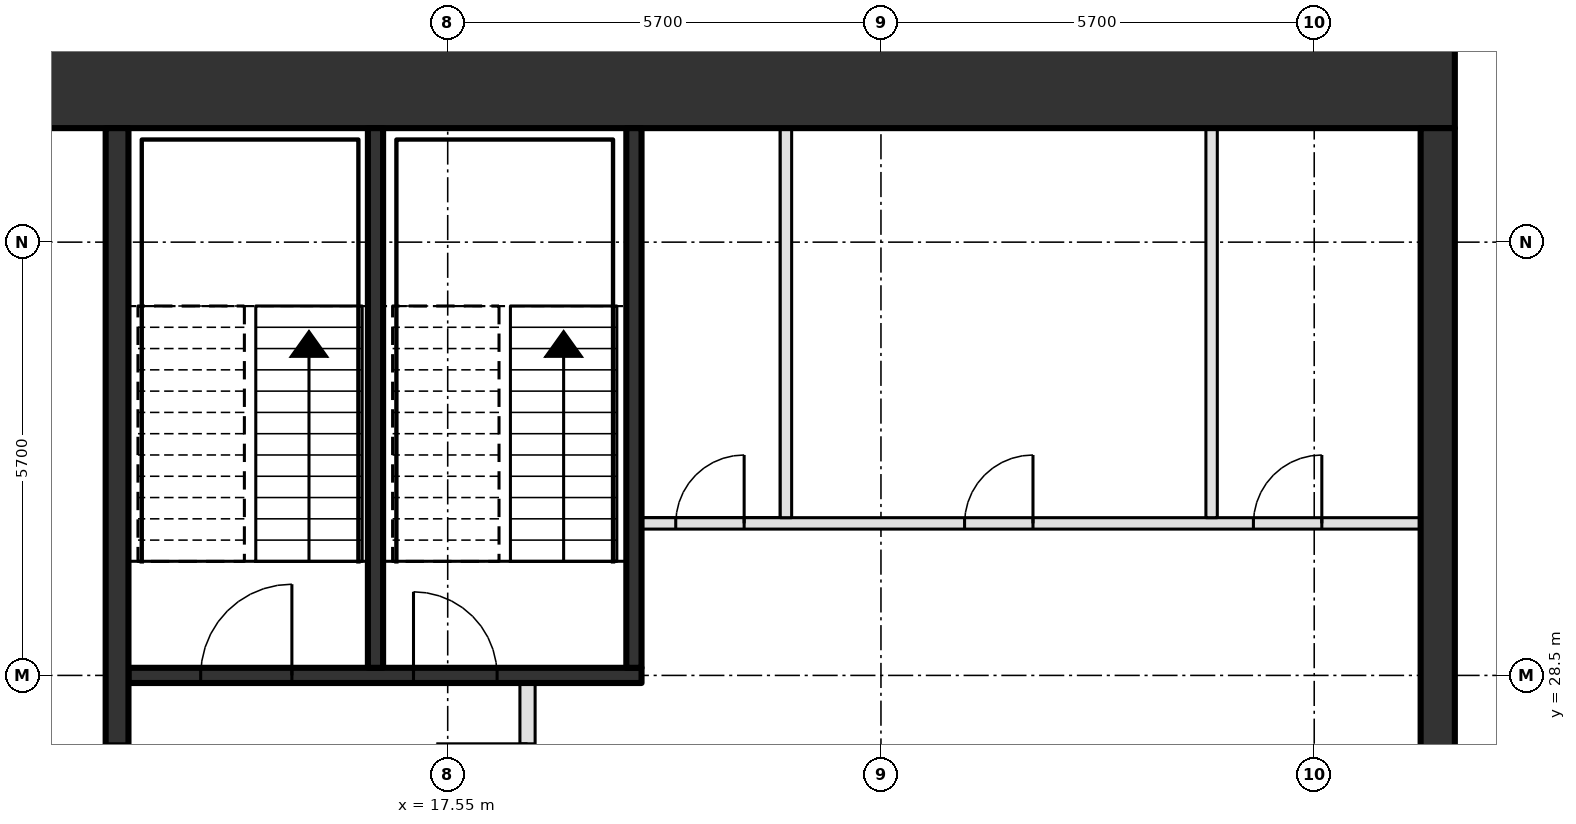
"""IFC4 building model, lengths in metres.
Left out: names, types, materials, properties, quantities, classifications, styles, units other than length and angle.
Written with IfcOpenShell. Run it as: python <this file> out.ifc"""

import sys

from ifc_helpers import new_model, si_unit, direction, frame, frame_2d, origin, place, context, subcontext, project, spatial, rectangle, extrude, element, fill, save


model = new_model("IFC4")
c1 = context("Model", 3, precision=1e-05, world=origin(), true_north=direction((0.0, 1.0)))
c2 = subcontext(c1, "Body", "Model", "MODEL_VIEW")
j1 = project(units=[si_unit("LENGTHUNIT", "METRE"), si_unit("PLANEANGLEUNIT", "RADIAN")], contexts=[c1])
p1 = place(None, origin())
s1 = spatial("IfcSite", under=j1, at=p1, CompositionType="ELEMENT")
p2 = place(p1, origin())
s2 = spatial("IfcBuilding", under=s1, at=p2, CompositionType="ELEMENT")
p3 = place(p2, frame((0.0, 0.0, 424.2)))
s3 = spatial("IfcBuildingStorey", under=s2, at=p3, CompositionType="ELEMENT", Elevation=424.2)
p4 = place(p3, frame((8.0, 36.3, -0.3), z_axis=(0.0, 0.0, 1.0), x_axis=(1.0, 0.0, 0.0)))
e1 = element("IfcWall", 1, at=p4, inside=s3, PredefinedType="SHEAR", context=c2, shape_type="SweptSolid", body=[
    extrude(rectangle(XDim=22.8, YDim=1.2, at=frame_2d((11.4, 0.0))), origin(), (0.0, 0.0, 1.0), 4.75),
])
p5 = place(p4, frame((2.3, 0.0, 0.3)))
e2 = element("IfcOpeningElement", 2, at=p5, cuts=e1, PredefinedType="OPENING", context=c2, shape_type="SweptSolid", body=[
    extrude(rectangle(XDim=1.8, YDim=2.1, at=frame_2d((0.9, 1.05))), frame((0.0, 0.61, 0.0), z_axis=(0.0, -1.0, 0.0), x_axis=(1.0, 0.0, 0.0)), (0.0, 0.0, 1.0), 1.22),
])
p6 = place(p3, frame((30.575, 14.55, -0.3), z_axis=(0.0, 0.0, 1.0), x_axis=(0.0, 1.0, 0.0)))
e3 = element("IfcWall", 3, at=p6, inside=s3, PredefinedType="SHEAR", context=c2, shape_type="SweptSolid", body=[
    extrude(rectangle(XDim=21.15, YDim=0.45, at=frame_2d((10.575, 0.0))), origin(), (0.0, 0.0, 1.0), 4.75),
])
p7 = place(p3, frame((13.35, 28.5, 0.0), z_axis=(0.0, 0.0, 1.0), x_axis=(1.0, 0.0, 0.0)))
e4 = element("IfcWall", 4, at=p7, inside=s3, PredefinedType="SOLIDWALL", context=c2, shape_type="SweptSolid", body=[
    extrude(rectangle(XDim=6.75, YDim=0.2, at=frame_2d((3.375, 0.0))), origin(), (0.0, 0.0, 1.0), 4.45),
])
p8 = place(p7, frame((0.95, 0.0, 0.0)))
e5 = element("IfcOpeningElement", 5, at=p8, cuts=e4, PredefinedType="OPENING", context=c2, shape_type="SweptSolid", body=[
    extrude(rectangle(XDim=1.2, YDim=2.1, at=frame_2d((0.6, 1.05))), frame((0.0, 0.11, 0.0), z_axis=(0.0, -1.0, 0.0), x_axis=(1.0, 0.0, 0.0)), (0.0, 0.0, 1.0), 0.22),
])
p9 = place(p7, frame((3.75, 0.0, 0.0)))
e6 = element("IfcOpeningElement", 6, at=p9, cuts=e4, PredefinedType="OPENING", context=c2, shape_type="SweptSolid", body=[
    extrude(rectangle(XDim=1.1, YDim=2.1, at=frame_2d((0.55, 1.05))), frame((0.0, 0.11, 0.0), z_axis=(0.0, -1.0, 0.0), x_axis=(1.0, 0.0, 0.0)), (0.0, 0.0, 1.0), 0.22),
])
p10 = place(p3, frame((20.1, 30.5, 0.0), z_axis=(0.0, 0.0, 1.0), x_axis=(1.0, 0.0, 0.0)))
e7 = element("IfcWall", 7, at=p10, inside=s3, PredefinedType="PARTITIONING", context=c2, shape_type="SweptSolid", body=[
    extrude(rectangle(XDim=10.25, YDim=0.15, at=frame_2d((5.125, 0.0))), origin(), (0.0, 0.0, 1.0), 4.45),
])
p11 = place(p10, frame((0.45, 0.0, 0.0)))
e8 = element("IfcOpeningElement", 8, at=p11, cuts=e7, PredefinedType="OPENING", context=c2, shape_type="SweptSolid", body=[
    extrude(rectangle(XDim=0.9, YDim=2.1, at=frame_2d((0.45, 1.05))), frame((0.0, 0.085, 0.0), z_axis=(0.0, -1.0, 0.0), x_axis=(1.0, 0.0, 0.0)), (0.0, 0.0, 1.0), 0.17),
])
p12 = place(p10, frame((4.25, 0.0, 0.0)))
e9 = element("IfcOpeningElement", 9, at=p12, cuts=e7, PredefinedType="OPENING", context=c2, shape_type="SweptSolid", body=[
    extrude(rectangle(XDim=0.9, YDim=2.1, at=frame_2d((0.45, 1.05))), frame((0.0, 0.085, 0.0), z_axis=(0.0, -1.0, 0.0), x_axis=(1.0, 0.0, 0.0)), (0.0, 0.0, 1.0), 0.17),
])
p13 = place(p10, frame((8.05, 0.0, 0.0)))
e10 = element("IfcOpeningElement", 10, at=p13, cuts=e7, PredefinedType="OPENING", context=c2, shape_type="SweptSolid", body=[
    extrude(rectangle(XDim=0.9, YDim=2.1, at=frame_2d((0.45, 1.05))), frame((0.0, 0.085, 0.0), z_axis=(0.0, -1.0, 0.0), x_axis=(1.0, 0.0, 0.0)), (0.0, 0.0, 1.0), 0.17),
])
p14 = place(p3, frame((13.2, 14.55, 0.0), z_axis=(0.0, 0.0, 1.0), x_axis=(0.0, 1.0, 0.0)))
e11 = element("IfcWall", 11, at=p14, inside=s3, PredefinedType="SHEAR", context=c2, shape_type="SweptSolid", body=[
    extrude(rectangle(XDim=21.15, YDim=0.3, at=frame_2d((10.575, 0.0))), origin(), (0.0, 0.0, 1.0), 4.45),
])
p15 = place(p14, frame((3.75, 0.0, 0.0)))
e12 = element("IfcOpeningElement", 12, at=p15, cuts=e11, PredefinedType="OPENING", context=c2, shape_type="SweptSolid", body=[
    extrude(rectangle(XDim=1.8, YDim=2.1, at=frame_2d((0.9, 1.05))), frame((0.0, 0.16, 0.0), z_axis=(0.0, -1.0, 0.0), x_axis=(1.0, 0.0, 0.0)), (0.0, 0.0, 1.0), 0.32),
])
p16 = place(p14, frame((11.85, 0.0, 0.0)))
e13 = element("IfcOpeningElement", 13, at=p16, cuts=e11, PredefinedType="OPENING", context=c2, shape_type="SweptSolid", body=[
    extrude(rectangle(XDim=1.2, YDim=2.1, at=frame_2d((0.6, 1.05))), frame((0.0, 0.16, 0.0), z_axis=(0.0, -1.0, 0.0), x_axis=(1.0, 0.0, 0.0)), (0.0, 0.0, 1.0), 0.32),
])
p17 = place(p3, frame((16.6, 28.6, 0.0), z_axis=(0.0, 0.0, 1.0), x_axis=(0.0, 1.0, 0.0)))
e14 = element("IfcWall", 14, at=p17, inside=s3, PredefinedType="SOLIDWALL", context=c2, shape_type="SweptSolid", body=[
    extrude(rectangle(XDim=7.1, YDim=0.2, at=frame_2d((3.55, 0.0))), origin(), (0.0, 0.0, 1.0), 4.45),
])
p18 = place(p3, frame((18.6, 23.25, 0.0), z_axis=(0.0, 0.0, 1.0), x_axis=(0.0, 1.0, 0.0)))
e15 = element("IfcWall", 15, at=p18, inside=s3, PredefinedType="SOLIDWALL", context=c2, shape_type="SweptSolid", body=[
    extrude(rectangle(XDim=5.15, YDim=0.2, at=frame_2d((2.575, 0.0))), origin(), (0.0, 0.0, 1.0), 4.45),
])
p19 = place(p18, frame((3.15, 0.0, 0.0)))
e16 = element("IfcOpeningElement", 16, at=p19, cuts=e15, PredefinedType="OPENING", context=c2, shape_type="SweptSolid", body=[
    extrude(rectangle(XDim=1.2, YDim=2.1, at=frame_2d((0.6, 1.05))), frame((0.0, 0.11, 0.0), z_axis=(0.0, -1.0, 0.0), x_axis=(1.0, 0.0, 0.0)), (0.0, 0.0, 1.0), 0.22),
])
p20 = place(p3, frame((20.0, 28.6, 0.0), z_axis=(0.0, 0.0, 1.0), x_axis=(0.0, 1.0, 0.0)))
e17 = element("IfcWall", 17, at=p20, inside=s3, PredefinedType="SOLIDWALL", context=c2, shape_type="SweptSolid", body=[
    extrude(rectangle(XDim=7.1, YDim=0.2, at=frame_2d((3.55, 0.0))), origin(), (0.0, 0.0, 1.0), 4.45),
])
for number, where, z_axis, x_axis in (
    (18, (22.0, 30.575, 0.0), (0.0, 0.0, 1.0), (0.0, 1.0, 0.0)),
    (19, (27.6, 30.575, 0.0), (0.0, 0.0, 1.0), (0.0, 1.0, 0.0)),
):
    element("IfcWall", number, at=place(p3, frame(where, z_axis=z_axis, x_axis=x_axis)), inside=s3, PredefinedType="PARTITIONING", context=c2, shape_type="SweptSolid", body=[
        extrude(rectangle(XDim=5.125, YDim=0.15, at=frame_2d((2.562, 0.0))), origin(), (0.0, 0.0, 1.0), 4.45),
    ])
p21 = place(p11, origin())
e20 = element("IfcDoor", 20, at=p21, inside=s3, OperationType="SINGLE_SWING_RIGHT", PredefinedType="DOOR", context=c2, shape_type="SweptSolid", body=[
    extrude(rectangle(XDim=0.9, YDim=2.1, at=frame_2d((0.45, 1.05))), frame((0.0, 0.025, 0.0), z_axis=(0.0, -1.0, 0.0), x_axis=(1.0, 0.0, 0.0)), (0.0, 0.0, 1.0), 0.05),
])
fill(e8, e20)
p22 = place(p12, origin())
e21 = element("IfcDoor", 21, at=p22, inside=s3, OperationType="SINGLE_SWING_RIGHT", PredefinedType="DOOR", context=c2, shape_type="SweptSolid", body=[
    extrude(rectangle(XDim=0.9, YDim=2.1, at=frame_2d((0.45, 1.05))), frame((0.0, 0.025, 0.0), z_axis=(0.0, -1.0, 0.0), x_axis=(1.0, 0.0, 0.0)), (0.0, 0.0, 1.0), 0.05),
])
fill(e9, e21)
p23 = place(p13, origin())
e22 = element("IfcDoor", 22, at=p23, inside=s3, OperationType="SINGLE_SWING_RIGHT", PredefinedType="DOOR", context=c2, shape_type="SweptSolid", body=[
    extrude(rectangle(XDim=0.9, YDim=2.1, at=frame_2d((0.45, 1.05))), frame((0.0, 0.025, 0.0), z_axis=(0.0, -1.0, 0.0), x_axis=(1.0, 0.0, 0.0)), (0.0, 0.0, 1.0), 0.05),
])
fill(e10, e22)
p24 = place(p8, origin())
e23 = element("IfcDoor", 23, at=p24, inside=s3, OperationType="SINGLE_SWING_RIGHT", PredefinedType="DOOR", context=c2, shape_type="SweptSolid", body=[
    extrude(rectangle(XDim=1.2, YDim=2.1, at=frame_2d((0.6, 1.05))), frame((0.0, 0.025, 0.0), z_axis=(0.0, -1.0, 0.0), x_axis=(1.0, 0.0, 0.0)), (0.0, 0.0, 1.0), 0.05),
])
fill(e5, e23)
p25 = place(p9, origin())
e24 = element("IfcDoor", 24, at=p25, inside=s3, OperationType="SINGLE_SWING_LEFT", PredefinedType="DOOR", context=c2, shape_type="SweptSolid", body=[
    extrude(rectangle(XDim=1.1, YDim=2.1, at=frame_2d((0.55, 1.05))), frame((0.0, 0.025, 0.0), z_axis=(0.0, -1.0, 0.0), x_axis=(1.0, 0.0, 0.0)), (0.0, 0.0, 1.0), 0.05),
])
fill(e6, e24)
p26 = place(p16, origin())
e25 = element("IfcDoor", 25, at=p26, inside=s3, OperationType="SINGLE_SWING_LEFT", PredefinedType="DOOR", context=c2, shape_type="SweptSolid", body=[
    extrude(rectangle(XDim=1.2, YDim=2.1, at=frame_2d((0.6, 1.05))), frame((0.0, 0.025, 0.0), z_axis=(0.0, -1.0, 0.0), x_axis=(1.0, 0.0, 0.0)), (0.0, 0.0, 1.0), 0.05),
])
fill(e13, e25)
save(model, sys.argv[1])
